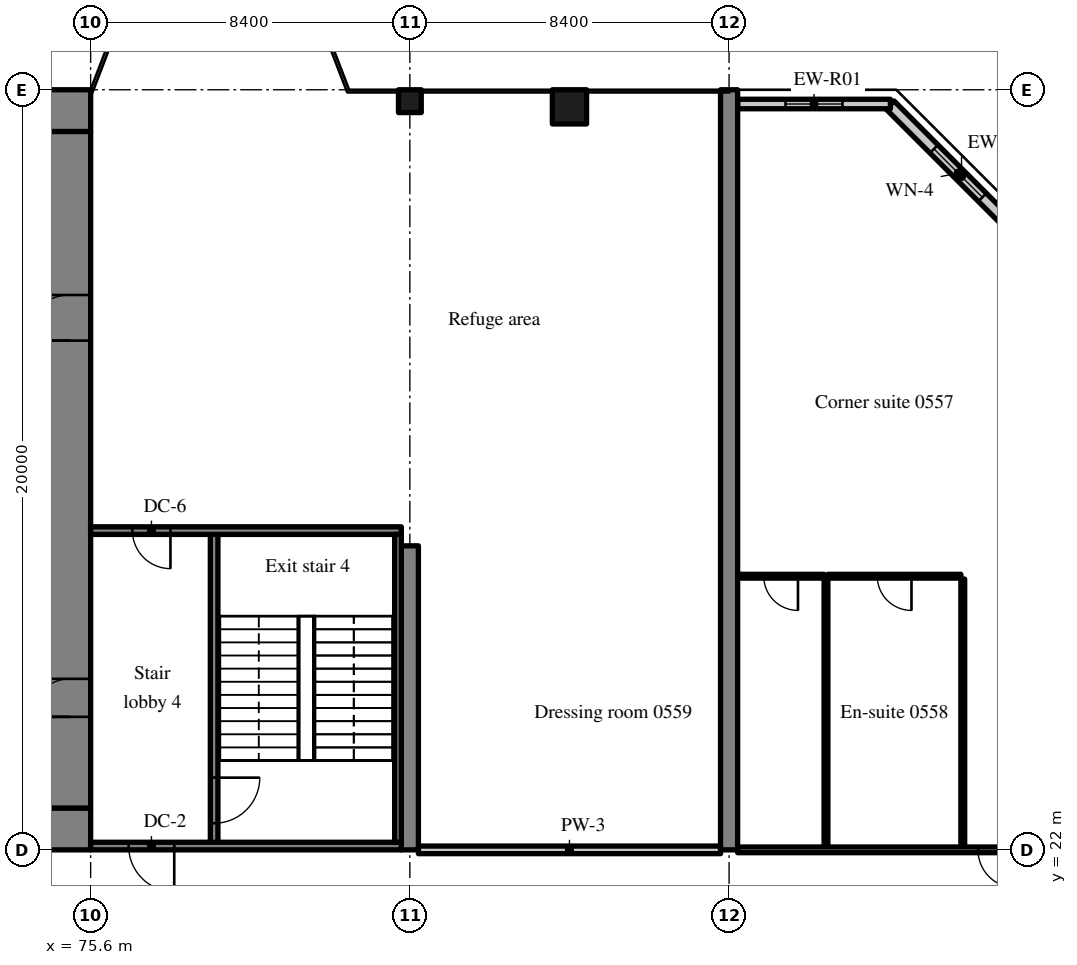
"""IFC4 building model, lengths in metres.
Left out: names, types, materials, properties, quantities, classifications, styles, units other than length and angle.
Written with IfcOpenShell. Run it as: python <this file> out.ifc"""

import sys

from ifc_helpers import new_model, si_unit, direction, frame, frame_2d, origin, origin_2d, place, context, subcontext, project, spatial, rectangle, extrude, source, transform, mapped, element, fill, save


model = new_model("IFC4")
c1 = context("Model", 3, precision=1e-05, world=origin(), true_north=direction((0.0, 1.0)))
c2 = subcontext(c1, "Body", "Model", "MODEL_VIEW")
j1 = project(units=[si_unit("LENGTHUNIT", "METRE"), si_unit("PLANEANGLEUNIT", "RADIAN")], contexts=[c1])
p1 = place(None, origin())
s1 = spatial("IfcSite", under=j1, at=p1, CompositionType="ELEMENT")
p2 = place(p1, origin())
s2 = spatial("IfcBuilding", under=s1, at=p2, CompositionType="ELEMENT")
p3 = place(p2, frame((0.0, 0.0, 27.8)))
s3 = spatial("IfcBuildingStorey", under=s2, at=p3, CompositionType="ELEMENT", Elevation=27.8)
m1 = source(origin(), c2, "Body", "SweptSolid", [
    extrude(rectangle(XDim=50.4, YDim=1.1, at=frame_2d((25.2, 0.0))), origin(), (0.0, 0.0, 1.0), 3.52),
])
p4 = place(p3, frame((25.2, 22.55, 0.0), z_axis=(0.0, 0.0, 1.0), x_axis=(1.0, 0.0, 0.0)))
e1 = element("IfcWall", 1, at=p4, inside=s3, PredefinedType="SHEAR", context=c2, shape_type="MappedRepresentation", body=[
    mapped(m1, transform((0.0, 0.0, 0.0), scale=1.0)),
])
m2 = source(origin(), c2, "Body", "SweptSolid", [
    extrude(rectangle(XDim=1.8, YDim=2.1, at=frame_2d((0.9, 1.05))), frame((0.0, 0.56, 0.0), z_axis=(0.0, -1.0, 0.0), x_axis=(1.0, 0.0, 0.0)), (0.0, 0.0, 1.0), 1.12),
])
p5 = place(p4, frame((15.9, 0.0, 0.0)))
e2 = element("IfcOpeningElement", 2, at=p5, cuts=e1, PredefinedType="OPENING", context=c2, shape_type="MappedRepresentation", body=[
    mapped(m2, transform((0.0, 0.0, 0.0), scale=1.0)),
])
m3 = source(origin(), c2, "Body", "SweptSolid", [
    extrude(rectangle(XDim=1.2, YDim=2.1, at=frame_2d((0.6, 1.05))), frame((0.0, 0.56, 0.0), z_axis=(0.0, -1.0, 0.0), x_axis=(1.0, 0.0, 0.0)), (0.0, 0.0, 1.0), 1.12),
])
p6 = place(p4, frame((27.0, 0.0, 0.0)))
e3 = element("IfcOpeningElement", 3, at=p6, cuts=e1, PredefinedType="OPENING", context=c2, shape_type="MappedRepresentation", body=[
    mapped(m3, transform((0.0, 0.0, 0.0), scale=1.0)),
])
m4 = source(origin(), c2, "Body", "SweptSolid", [
    extrude(rectangle(XDim=0.9, YDim=2.1, at=frame_2d((0.45, 1.05))), frame((0.0, 0.56, 0.0), z_axis=(0.0, -1.0, 0.0), x_axis=(1.0, 0.0, 0.0)), (0.0, 0.0, 1.0), 1.12),
])
p7 = place(p4, frame((32.25, 0.0, 0.0)))
e4 = element("IfcOpeningElement", 4, at=p7, cuts=e1, PredefinedType="OPENING", context=c2, shape_type="MappedRepresentation", body=[
    mapped(m4, transform((0.0, 0.0, 0.0), scale=1.0)),
])
p8 = place(p4, frame((38.25, 0.0, 0.0)))
e5 = element("IfcOpeningElement", 5, at=p8, cuts=e1, PredefinedType="OPENING", context=c2, shape_type="MappedRepresentation", body=[
    mapped(m4, transform((0.0, 0.0, 0.0), scale=1.0)),
])
p9 = place(p4, frame((6.425, 0.0, 0.0)))
e6 = element("IfcOpeningElement", 6, at=p9, cuts=e1, PredefinedType="OPENING", context=c2, shape_type="MappedRepresentation", body=[
    mapped(m3, transform((0.0, 0.0, 0.0), scale=1.0)),
])
p10 = place(p4, frame((47.675, 0.0, 0.0)))
e7 = element("IfcOpeningElement", 7, at=p10, cuts=e1, PredefinedType="OPENING", context=c2, shape_type="MappedRepresentation", body=[
    mapped(m3, transform((0.0, 0.0, 0.0), scale=1.0)),
])
p11 = place(p3, frame((25.2, 41.45, 0.0), z_axis=(0.0, 0.0, 1.0), x_axis=(1.0, 0.0, 0.0)))
e8 = element("IfcWall", 8, at=p11, inside=s3, PredefinedType="SHEAR", context=c2, shape_type="MappedRepresentation", body=[
    mapped(m1, transform((0.0, 0.0, 0.0), scale=1.0)),
])
m5 = source(origin(), c2, "Body", "SweptSolid", [
    extrude(rectangle(XDim=17.8, YDim=1.1, at=frame_2d((8.9, 0.0))), origin(), (0.0, 0.0, 1.0), 3.52),
])
p12 = place(p3, frame((75.05, 23.1, 0.0), z_axis=(0.0, 0.0, 1.0), x_axis=(0.0, 1.0, 0.0)))
e9 = element("IfcWall", 9, at=p12, inside=s3, PredefinedType="SHEAR", context=c2, shape_type="MappedRepresentation", body=[
    mapped(m5, transform((0.0, 0.0, 0.0), scale=1.0)),
])
m6 = source(origin(), c2, "Body", "SweptSolid", [
    extrude(rectangle(XDim=1.0, YDim=2.1, at=frame_2d((0.5, 1.05))), frame((0.0, 0.56, 0.0), z_axis=(0.0, -1.0, 0.0), x_axis=(1.0, 0.0, 0.0)), (0.0, 0.0, 1.0), 1.12),
])
p13 = place(p12, frame((2.4, 0.0, 0.0)))
e10 = element("IfcOpeningElement", 10, at=p13, cuts=e9, PredefinedType="OPENING", context=c2, shape_type="MappedRepresentation", body=[
    mapped(m6, transform((0.0, 0.0, 0.0), scale=1.0)),
])
p14 = place(p12, frame((12.3, 0.0, 0.0)))
e11 = element("IfcOpeningElement", 11, at=p14, cuts=e9, PredefinedType="OPENING", context=c2, shape_type="MappedRepresentation", body=[
    mapped(m3, transform((0.0, 0.0, 0.0), scale=1.0)),
])
m7 = source(origin(), c2, "Body", "SweptSolid", [
    extrude(rectangle(XDim=8.0, YDim=0.45, at=frame_2d((4.0, 0.0))), origin(), (0.0, 0.0, 1.0), 3.52),
])
p15 = place(p3, frame((84.0, 22.0, 0.0), z_axis=(0.0, 0.0, 1.0), x_axis=(0.0, 1.0, 0.0)))
e12 = element("IfcWall", 12, at=p15, inside=s3, PredefinedType="SHEAR", context=c2, shape_type="MappedRepresentation", body=[
    mapped(m7, transform((0.0, 0.0, 0.0), scale=1.0)),
])
m8 = source(origin(), c2, "Body", "SweptSolid", [
    extrude(rectangle(XDim=20.0, YDim=0.45, at=frame_2d((10.0, 0.0))), origin(), (0.0, 0.0, 1.0), 3.52),
])
p16 = place(p3, frame((92.4, 22.0, 0.0), z_axis=(0.0, 0.0, 1.0), x_axis=(0.0, 1.0, 0.0)))
e13 = element("IfcWall", 13, at=p16, inside=s3, PredefinedType="SHEAR", context=c2, shape_type="MappedRepresentation", body=[
    mapped(m8, transform((0.0, 0.0, 0.0), scale=1.0)),
])
m9 = source(origin(), c2, "Body", "SweptSolid", [
    extrude(rectangle(XDim=0.6, YDim=0.6, at=origin_2d()), origin(), (0.0, 0.0, 1.0), 3.52),
])
p17 = place(p3, frame((84.0, 41.7, 0.0), z_axis=(0.0, 0.0, 1.0), x_axis=(1.0, 0.0, 0.0)))
e14 = element("IfcColumn", 14, at=p17, inside=s3, PredefinedType="COLUMN", context=c2, shape_type="MappedRepresentation", body=[
    mapped(m9, transform((0.0, 0.0, 0.0), scale=1.0)),
])
m10 = source(origin(), c2, "Body", "SweptSolid", [
    extrude(rectangle(XDim=0.9, YDim=0.9, at=origin_2d()), origin(), (0.0, 0.0, 1.0), 3.52),
])
p18 = place(p3, frame((88.2, 41.55, 0.0), z_axis=(0.0, 0.0, 1.0), x_axis=(1.0, 0.0, 0.0)))
e15 = element("IfcColumn", 15, at=p18, inside=s3, PredefinedType="COLUMN", context=c2, shape_type="MappedRepresentation", body=[
    mapped(m10, transform((0.0, 0.0, 0.0), scale=1.0)),
])
m11 = source(origin(), c2, "Body", "SweptSolid", [
    extrude(rectangle(XDim=5.326, YDim=0.3, at=frame_2d((2.663, 0.0))), origin(), (0.0, 0.0, 1.0), 3.52),
])
p19 = place(p3, frame((100.4, 37.834, 0.0), z_axis=(0.0, 0.0, 1.0), x_axis=(-0.707083859269, 0.707129702361, 0.0)))
e16 = element("IfcWall", 16, at=p19, inside=s3, PredefinedType="SOLIDWALL", context=c2, shape_type="MappedRepresentation", body=[
    mapped(m11, transform((0.0, 0.0, 0.0), scale=1.0)),
])
m12 = source(origin(), c2, "Body", "SweptSolid", [
    extrude(rectangle(XDim=1.8, YDim=1.5, at=frame_2d((0.9, 0.75))), frame((0.0, 0.16, 0.0), z_axis=(0.0, -1.0, 0.0), x_axis=(1.0, 0.0, 0.0)), (0.0, 0.0, 1.0), 0.32),
])
p20 = place(p19, frame((1.889, 0.0, 0.9)))
e17 = element("IfcOpeningElement", 17, at=p20, cuts=e16, PredefinedType="OPENING", context=c2, shape_type="MappedRepresentation", body=[
    mapped(m12, transform((0.0, 0.0, 0.0), scale=1.0)),
])
m13 = source(origin(), c2, "Body", "SweptSolid", [
    extrude(rectangle(XDim=4.02, YDim=0.25, at=frame_2d((2.01, 0.0))), origin(), (0.0, 0.0, 1.0), 2.77),
])
p21 = place(p3, frame((96.645, 41.625, 0.0), z_axis=(0.0, 0.0, 1.0), x_axis=(-1.0, 0.0, 0.0)))
e18 = element("IfcWall", 18, at=p21, inside=s3, PredefinedType="SOLIDWALL", context=c2, shape_type="MappedRepresentation", body=[
    mapped(m13, transform((0.0, 0.0, 0.0), scale=1.0)),
])
m14 = source(origin(), c2, "Body", "SweptSolid", [
    extrude(rectangle(XDim=1.5, YDim=1.5, at=frame_2d((0.75, 0.75))), frame((0.0, 0.135, 0.0), z_axis=(0.0, -1.0, 0.0), x_axis=(1.0, 0.0, 0.0)), (0.0, 0.0, 1.0), 0.27),
])
p22 = place(p21, frame((1.26, 0.0, 0.9)))
e19 = element("IfcOpeningElement", 19, at=p22, cuts=e18, PredefinedType="OPENING", context=c2, shape_type="MappedRepresentation", body=[
    mapped(m14, transform((0.0, 0.0, 0.0), scale=1.0)),
])
m15 = source(origin(), c2, "Body", "SweptSolid", [
    extrude(rectangle(XDim=8.3, YDim=0.2, at=frame_2d((4.15, 0.0))), origin(), (0.0, 0.0, 1.0), 3.52),
])
p23 = place(p3, frame((78.85, 22.1, 0.0), z_axis=(0.0, 0.0, 1.0), x_axis=(0.0, 1.0, 0.0)))
e20 = element("IfcWall", 20, at=p23, inside=s3, PredefinedType="SOLIDWALL", context=c2, shape_type="MappedRepresentation", body=[
    mapped(m15, transform((0.0, 0.0, 0.0), scale=1.0)),
])
m16 = source(origin(), c2, "Body", "SweptSolid", [
    extrude(rectangle(XDim=1.2, YDim=2.1, at=frame_2d((0.6, 1.05))), frame((0.0, 0.11, 0.0), z_axis=(0.0, -1.0, 0.0), x_axis=(1.0, 0.0, 0.0)), (0.0, 0.0, 1.0), 0.22),
])
p24 = place(p23, frame((0.6, 0.0, 0.0)))
e21 = element("IfcOpeningElement", 21, at=p24, cuts=e20, PredefinedType="OPENING", context=c2, shape_type="MappedRepresentation", body=[
    mapped(m16, transform((0.0, 0.0, 0.0), scale=1.0)),
])
m17 = source(origin(), c2, "Body", "SweptSolid", [
    extrude(rectangle(XDim=8.175, YDim=0.2, at=frame_2d((4.087, 0.0))), origin(), (0.0, 0.0, 1.0), 3.52),
])
p25 = place(p3, frame((83.775, 22.1, 0.0), z_axis=(0.0, 0.0, 1.0), x_axis=(-1.0, 0.0, 0.0)))
e22 = element("IfcWall", 22, at=p25, inside=s3, PredefinedType="SOLIDWALL", context=c2, shape_type="MappedRepresentation", body=[
    mapped(m17, transform((0.0, 0.0, 0.0), scale=1.0)),
])
p26 = place(p25, frame((5.975, 0.0, 0.0)))
e23 = element("IfcOpeningElement", 23, at=p26, cuts=e22, PredefinedType="OPENING", context=c2, shape_type="MappedRepresentation", body=[
    mapped(m16, transform((0.0, 0.0, 0.0), scale=1.0)),
])
p27 = place(p3, frame((83.775, 30.4, 0.0), z_axis=(0.0, 0.0, 1.0), x_axis=(-1.0, 0.0, 0.0)))
e24 = element("IfcWall", 24, at=p27, inside=s3, PredefinedType="SOLIDWALL", context=c2, shape_type="MappedRepresentation", body=[
    mapped(m17, transform((0.0, 0.0, 0.0), scale=1.0)),
])
m18 = source(origin(), c2, "Body", "SweptSolid", [
    extrude(rectangle(XDim=1.0, YDim=2.1, at=frame_2d((0.5, 1.05))), frame((0.0, 0.11, 0.0), z_axis=(0.0, -1.0, 0.0), x_axis=(1.0, 0.0, 0.0)), (0.0, 0.0, 1.0), 0.22),
])
p28 = place(p27, frame((6.075, 0.0, 0.0)))
e25 = element("IfcOpeningElement", 25, at=p28, cuts=e24, PredefinedType="OPENING", context=c2, shape_type="MappedRepresentation", body=[
    mapped(m18, transform((0.0, 0.0, 0.0), scale=1.0)),
])
m19 = source(origin(), c2, "Body", "SweptSolid", [
    extrude(rectangle(XDim=8.1, YDim=0.175, at=frame_2d((4.05, 0.0))), origin(), (0.0, 0.0, 1.0), 3.52),
])
p29 = place(p3, frame((83.688, 22.2, 0.0), z_axis=(0.0, 0.0, 1.0), x_axis=(0.0, 1.0, 0.0)))
e26 = element("IfcWall", 26, at=p29, inside=s3, PredefinedType="SOLIDWALL", context=c2, shape_type="MappedRepresentation", body=[
    mapped(m19, transform((0.0, 0.0, 0.0), scale=1.0)),
])
m20 = source(origin(), c2, "Body", "SweptSolid", [
    extrude(rectangle(XDim=7.05, YDim=0.1, at=frame_2d((3.525, 0.0))), origin(), (0.0, 0.0, 1.0), 3.52),
])
for number, where, z_axis, x_axis in (
    (27, (98.55, 22.075, 0.0), (0.0, 0.0, 1.0), (0.0, 1.0, 0.0)),
    (28, (94.95, 22.075, 0.0), (0.0, 0.0, 1.0), (0.0, 1.0, 0.0)),
):
    element("IfcWall", number, at=place(p3, frame(where, z_axis=z_axis, x_axis=x_axis)), inside=s3, PredefinedType="PARTITIONING", context=c2, shape_type="MappedRepresentation", body=[
        mapped(m20, transform((0.0, 0.0, 0.0), scale=1.0)),
    ])
m21 = source(origin(), c2, "Body", "SweptSolid", [
    extrude(rectangle(XDim=3.5, YDim=0.1, at=frame_2d((1.75, 0.0))), origin(), (0.0, 0.0, 1.0), 3.52),
])
p30 = place(p3, frame((95.0, 29.2, 0.0), z_axis=(0.0, 0.0, 1.0), x_axis=(1.0, 0.0, 0.0)))
e29 = element("IfcWall", 29, at=p30, inside=s3, PredefinedType="PARTITIONING", context=c2, shape_type="MappedRepresentation", body=[
    mapped(m21, transform((0.0, 0.0, 0.0), scale=1.0)),
])
m22 = source(origin(), c2, "Body", "SweptSolid", [
    extrude(rectangle(XDim=0.9, YDim=2.1, at=frame_2d((0.45, 1.05))), frame((0.0, 0.06, 0.0), z_axis=(0.0, -1.0, 0.0), x_axis=(1.0, 0.0, 0.0)), (0.0, 0.0, 1.0), 0.12),
])
p31 = place(p30, frame((1.3, 0.0, 0.0)))
e30 = element("IfcOpeningElement", 30, at=p31, cuts=e29, PredefinedType="OPENING", context=c2, shape_type="MappedRepresentation", body=[
    mapped(m22, transform((0.0, 0.0, 0.0), scale=1.0)),
])
m23 = source(origin(), c2, "Body", "SweptSolid", [
    extrude(rectangle(XDim=2.275, YDim=0.1, at=frame_2d((1.137, 0.0))), origin(), (0.0, 0.0, 1.0), 3.52),
])
p32 = place(p3, frame((92.625, 29.2, 0.0), z_axis=(0.0, 0.0, 1.0), x_axis=(1.0, 0.0, 0.0)))
e31 = element("IfcWall", 31, at=p32, inside=s3, PredefinedType="PARTITIONING", context=c2, shape_type="MappedRepresentation", body=[
    mapped(m23, transform((0.0, 0.0, 0.0), scale=1.0)),
])
p33 = place(p32, frame((0.688, 0.0, 0.0)))
e32 = element("IfcOpeningElement", 32, at=p33, cuts=e31, PredefinedType="OPENING", context=c2, shape_type="MappedRepresentation", body=[
    mapped(m22, transform((0.0, 0.0, 0.0), scale=1.0)),
])
m24 = source(origin(), c2, "Body", "SweptSolid", [
    extrude(rectangle(XDim=7.725, YDim=0.15, at=frame_2d((3.863, 0.0))), origin(), (0.0, 0.0, 1.0), 2.82),
])
p34 = place(p3, frame((92.625, 22.0, 0.0), z_axis=(0.0, 0.0, 1.0), x_axis=(1.0, 0.0, 0.0)))
e33 = element("IfcWall", 33, at=p34, inside=s3, PredefinedType="PARTITIONING", context=c2, shape_type="MappedRepresentation", body=[
    mapped(m24, transform((0.0, 0.0, 0.0), scale=1.0)),
])
m25 = source(origin(), c2, "Body", "SweptSolid", [
    extrude(rectangle(XDim=1.0, YDim=2.1, at=frame_2d((0.5, 1.05))), frame((0.0, 0.085, 0.0), z_axis=(0.0, -1.0, 0.0), x_axis=(1.0, 0.0, 0.0)), (0.0, 0.0, 1.0), 0.17),
])
p35 = place(p34, frame((6.325, 0.0, 0.0)))
e34 = element("IfcOpeningElement", 34, at=p35, cuts=e33, PredefinedType="OPENING", context=c2, shape_type="MappedRepresentation", body=[
    mapped(m25, transform((0.0, 0.0, 0.0), scale=1.0)),
])
m26 = source(origin(), c2, "Body", "SweptSolid", [
    extrude(rectangle(XDim=7.95, YDim=0.2, at=frame_2d((3.975, 0.0))), origin(), (0.0, 0.0, 1.0), 2.82),
])
p36 = place(p3, frame((84.225, 22.0, 0.0), z_axis=(0.0, 0.0, 1.0), x_axis=(1.0, 0.0, 0.0)))
e35 = element("IfcWall", 35, at=p36, inside=s3, PredefinedType="PARTITIONING", context=c2, shape_type="MappedRepresentation", body=[
    mapped(m26, transform((0.0, 0.0, 0.0), scale=1.0)),
])
m27 = source(origin(), c2, "Body", "SweptSolid", [
    extrude(rectangle(XDim=1.8, YDim=1.5, at=frame_2d((0.9, 0.75))), frame((0.0, 0.03, 0.0), z_axis=(0.0, -1.0, 0.0), x_axis=(1.0, 0.0, 0.0)), (0.0, 0.0, 1.0), 0.06),
])
p37 = place(p20, origin())
e36 = element("IfcWindow", 36, at=p37, inside=s3, PartitioningType="SINGLE_PANEL", PredefinedType="WINDOW", context=c2, shape_type="MappedRepresentation", body=[
    mapped(m27, transform((0.0, 0.0, 0.0), scale=1.0)),
])
fill(e17, e36)
m28 = source(origin(), c2, "Body", "SweptSolid", [
    extrude(rectangle(XDim=1.5, YDim=1.5, at=frame_2d((0.75, 0.75))), frame((0.0, 0.03, 0.0), z_axis=(0.0, -1.0, 0.0), x_axis=(1.0, 0.0, 0.0)), (0.0, 0.0, 1.0), 0.06),
])
p38 = place(p22, origin())
e37 = element("IfcWindow", 37, at=p38, inside=s3, PartitioningType="SINGLE_PANEL", PredefinedType="WINDOW", context=c2, shape_type="MappedRepresentation", body=[
    mapped(m28, transform((0.0, 0.0, 0.0), scale=1.0)),
])
fill(e19, e37)
m29 = source(origin(), c2, "Body", "SweptSolid", [
    extrude(rectangle(XDim=1.0, YDim=2.1, at=frame_2d((0.5, 1.05))), frame((0.0, 0.025, 0.0), z_axis=(0.0, -1.0, 0.0), x_axis=(1.0, 0.0, 0.0)), (0.0, 0.0, 1.0), 0.05),
])
p39 = place(p13, origin())
e38 = element("IfcDoor", 38, at=p39, inside=s3, OperationType="SINGLE_SWING_LEFT", PredefinedType="DOOR", context=c2, shape_type="MappedRepresentation", body=[
    mapped(m29, transform((0.0, 0.0, 0.0), scale=1.0)),
])
fill(e10, e38)
m30 = source(origin(), c2, "Body", "SweptSolid", [
    extrude(rectangle(XDim=1.2, YDim=2.1, at=frame_2d((0.6, 1.05))), frame((0.0, 0.025, 0.0), z_axis=(0.0, -1.0, 0.0), x_axis=(1.0, 0.0, 0.0)), (0.0, 0.0, 1.0), 0.05),
])
p40 = place(p14, origin())
e39 = element("IfcDoor", 39, at=p40, inside=s3, OperationType="SINGLE_SWING_LEFT", PredefinedType="DOOR", context=c2, shape_type="MappedRepresentation", body=[
    mapped(m30, transform((0.0, 0.0, 0.0), scale=1.0)),
])
fill(e11, e39)
p41 = place(p24, origin())
e40 = element("IfcDoor", 40, at=p41, inside=s3, OperationType="SINGLE_SWING_RIGHT", PredefinedType="DOOR", context=c2, shape_type="MappedRepresentation", body=[
    mapped(m30, transform((0.0, 0.0, 0.0), scale=1.0)),
])
fill(e21, e40)
p42 = place(p26, origin())
e41 = element("IfcDoor", 41, at=p42, inside=s3, OperationType="SINGLE_SWING_LEFT", PredefinedType="DOOR", context=c2, shape_type="MappedRepresentation", body=[
    mapped(m30, transform((0.0, 0.0, 0.0), scale=1.0)),
])
fill(e23, e41)
p43 = place(p28, origin())
e42 = element("IfcDoor", 42, at=p43, inside=s3, OperationType="SINGLE_SWING_LEFT", PredefinedType="DOOR", context=c2, shape_type="MappedRepresentation", body=[
    mapped(m29, transform((0.0, 0.0, 0.0), scale=1.0)),
])
fill(e25, e42)
m31 = source(origin(), c2, "Body", "SweptSolid", [
    extrude(rectangle(XDim=0.9, YDim=2.1, at=frame_2d((0.45, 1.05))), frame((0.0, 0.025, 0.0), z_axis=(0.0, -1.0, 0.0), x_axis=(1.0, 0.0, 0.0)), (0.0, 0.0, 1.0), 0.05),
])
p44 = place(p31, origin())
e43 = element("IfcDoor", 43, at=p44, inside=s3, OperationType="SINGLE_SWING_RIGHT", PredefinedType="DOOR", context=c2, shape_type="MappedRepresentation", body=[
    mapped(m31, transform((0.0, 0.0, 0.0), scale=1.0)),
])
fill(e30, e43)
p45 = place(p33, origin())
e44 = element("IfcDoor", 44, at=p45, inside=s3, OperationType="SINGLE_SWING_RIGHT", PredefinedType="DOOR", context=c2, shape_type="MappedRepresentation", body=[
    mapped(m31, transform((0.0, 0.0, 0.0), scale=1.0)),
])
fill(e32, e44)
p46 = place(p35, origin())
e45 = element("IfcDoor", 45, at=p46, inside=s3, OperationType="SINGLE_SWING_RIGHT", PredefinedType="DOOR", context=c2, shape_type="MappedRepresentation", body=[
    mapped(m29, transform((0.0, 0.0, 0.0), scale=1.0)),
])
fill(e34, e45)
save(model, sys.argv[1])
